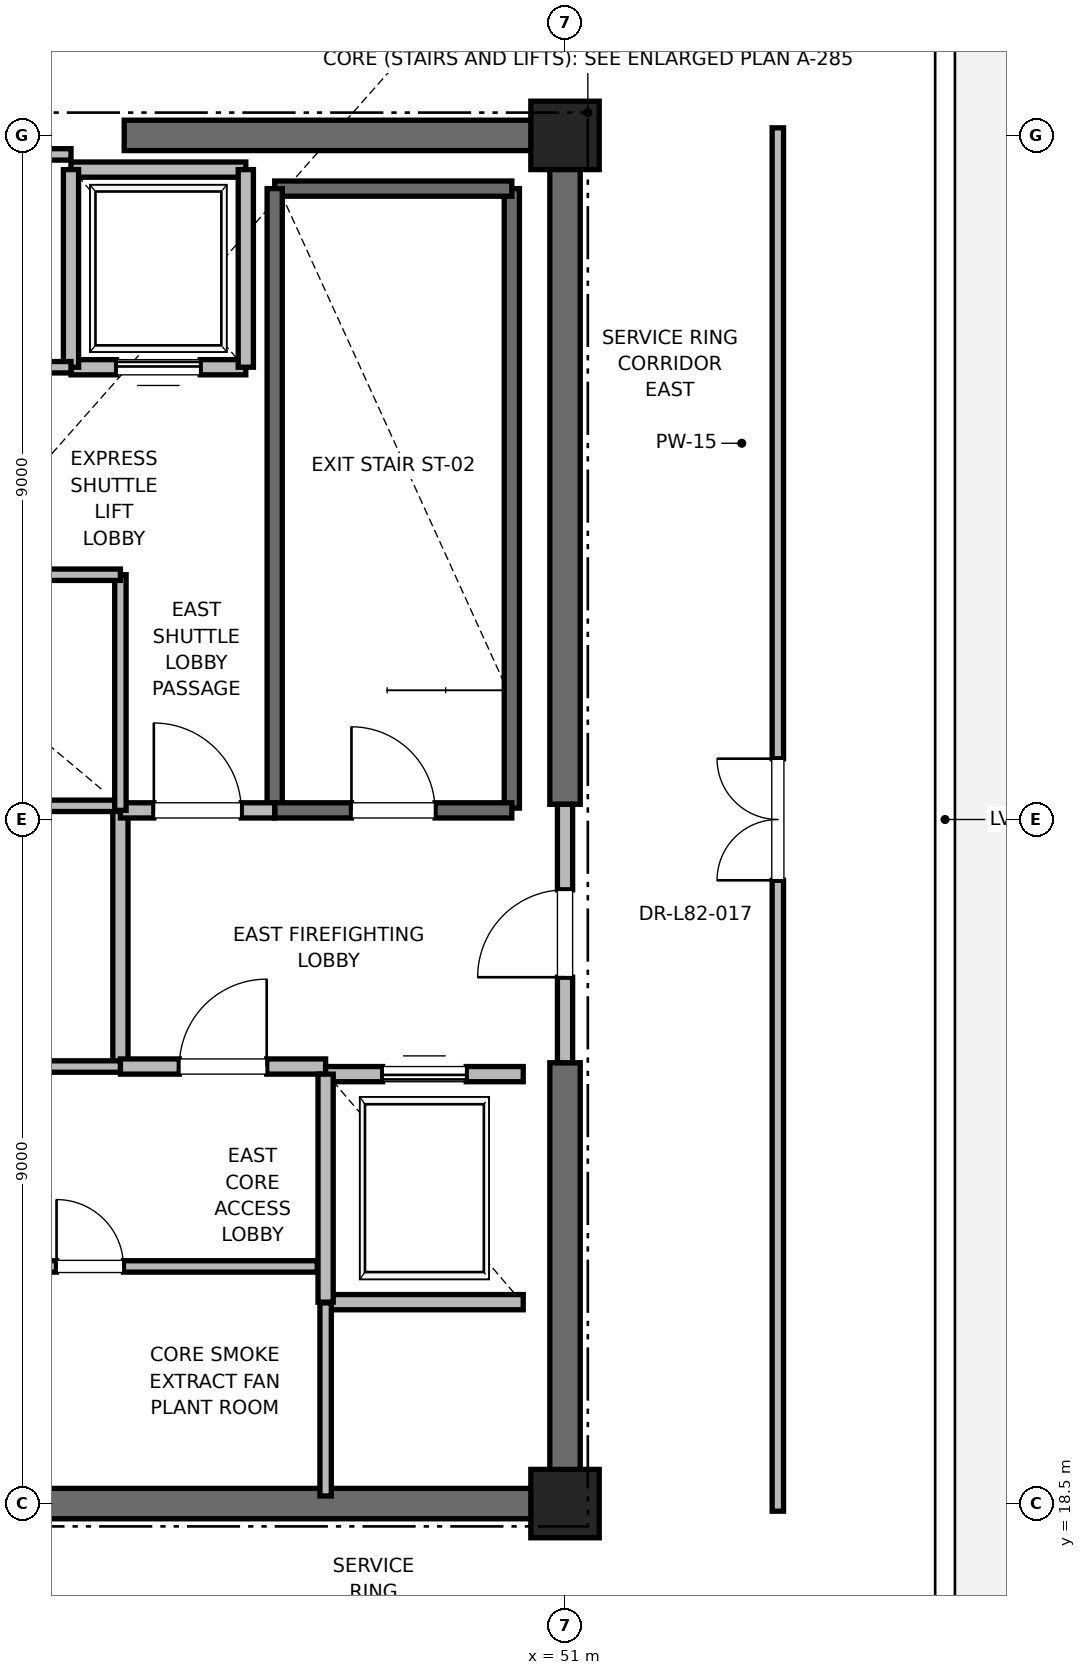
"""IFC4 building model, lengths in metres.
Left out: names, types, materials, properties, quantities, classifications, styles, units other than length and angle.
Written with IfcOpenShell. Run it as: python <this file> out.ifc"""

import sys

from ifc_helpers import new_model, si_unit, direction, frame, frame_2d, origin, origin_2d, place, context, subcontext, project, spatial, rectangle, extrude, element, fill, save


model = new_model("IFC4")
c1 = context("Model", 3, precision=1e-05, world=origin(), true_north=direction((0.0, 1.0)))
c2 = subcontext(c1, "Body", "Model", "MODEL_VIEW")
j1 = project(units=[si_unit("LENGTHUNIT", "METRE"), si_unit("PLANEANGLEUNIT", "RADIAN")], contexts=[c1])
p1 = place(None, origin())
s1 = spatial("IfcSite", under=j1, at=p1, CompositionType="ELEMENT")
p2 = place(p1, origin())
s2 = spatial("IfcBuilding", under=s1, at=p2, CompositionType="ELEMENT")
p3 = place(p2, frame((0.0, 0.0, 354.3)))
s3 = spatial("IfcBuildingStorey", under=s2, at=p3, CompositionType="ELEMENT", Elevation=354.3)
for number, where, z_axis, x_axis in (
    (1, (51.0, 18.5, 0.0), (0.0, 0.0, 1.0), (1.0, 0.0, 0.0)),
    (2, (51.0, 36.5, 0.0), (0.0, 0.0, 1.0), (1.0, 0.0, 0.0)),
):
    element("IfcColumn", number, at=place(p3, frame(where, z_axis=z_axis, x_axis=x_axis)), inside=s3, PredefinedType="PILASTER", context=c2, shape_type="SweptSolid", body=[
        extrude(rectangle(XDim=0.9, YDim=0.9, at=origin_2d()), origin(), (0.0, 0.0, 1.0), 5.5),
    ])
p4 = place(p3, frame((41.8, 18.5, 0.0), z_axis=(0.0, 0.0, 1.0), x_axis=(1.0, 0.0, 0.0)))
e3 = element("IfcWall", 3, at=p4, inside=s3, PredefinedType="SHEAR", context=c2, shape_type="SweptSolid", body=[
    extrude(rectangle(XDim=9.2, YDim=0.4, at=frame_2d((4.6, 0.0))), origin(), (0.0, 0.0, 1.0), 5.24),
])
for number, where, z_axis, x_axis in (
    (4, (45.2, 36.5, 0.0), (0.0, 0.0, 1.0), (1.0, 0.0, 0.0)),
    (5, (51.0, 18.5, 0.0), (0.0, 0.0, 1.0), (0.0, 1.0, 0.0)),
):
    element("IfcWall", number, at=place(p3, frame(where, z_axis=z_axis, x_axis=x_axis)), inside=s3, PredefinedType="SHEAR", context=c2, shape_type="SweptSolid", body=[
        extrude(rectangle(XDim=5.8, YDim=0.4, at=frame_2d((2.9, 0.0))), origin(), (0.0, 0.0, 1.0), 5.24),
    ])
p5 = place(p3, frame((51.0, 27.7, 0.0), z_axis=(0.0, 0.0, 1.0), x_axis=(0.0, 1.0, 0.0)))
e6 = element("IfcWall", 6, at=p5, inside=s3, PredefinedType="SHEAR", context=c2, shape_type="SweptSolid", body=[
    extrude(rectangle(XDim=8.8, YDim=0.4, at=frame_2d((4.4, 0.0))), origin(), (0.0, 0.0, 1.0), 5.24),
])
p6 = place(p3, frame((50.3, 27.65, 0.0), z_axis=(0.0, 0.0, 1.0), x_axis=(0.0, 1.0, 0.0)))
e7 = element("IfcWall", 7, at=p6, inside=s3, PredefinedType="SOLIDWALL", context=c2, shape_type="SweptSolid", body=[
    extrude(rectangle(XDim=8.15, YDim=0.2, at=frame_2d((4.075, 0.0))), origin(), (0.0, 0.0, 1.0), 5.24),
])
p7 = place(p3, frame((47.18, 35.8, 0.0), z_axis=(0.0, 0.0, 1.0), x_axis=(1.0, 0.0, 0.0)))
e8 = element("IfcWall", 8, at=p7, inside=s3, PredefinedType="SOLIDWALL", context=c2, shape_type="SweptSolid", body=[
    extrude(rectangle(XDim=3.12, YDim=0.2, at=frame_2d((1.56, 0.0))), origin(), (0.0, 0.0, 1.0), 5.24),
])
p8 = place(p3, frame((47.18, 27.62, 0.0), z_axis=(0.0, 0.0, 1.0), x_axis=(0.0, 1.0, 0.0)))
e9 = element("IfcWall", 9, at=p8, inside=s3, PredefinedType="SOLIDWALL", context=c2, shape_type="SweptSolid", body=[
    extrude(rectangle(XDim=8.18, YDim=0.2, at=frame_2d((4.09, 0.0))), origin(), (0.0, 0.0, 1.0), 5.24),
])
p9 = place(p3, frame((47.18, 27.62, 0.0), z_axis=(0.0, 0.0, 1.0), x_axis=(1.0, 0.0, 0.0)))
e10 = element("IfcWall", 10, at=p9, inside=s3, PredefinedType="SOLIDWALL", context=c2, shape_type="SweptSolid", body=[
    extrude(rectangle(XDim=3.12, YDim=0.2, at=frame_2d((1.56, 0.0))), origin(), (0.0, 0.0, 1.0), 5.24),
])
p10 = place(p9, frame((1.01, 0.0, 0.0)))
e11 = element("IfcOpeningElement", 11, at=p10, cuts=e10, PredefinedType="OPENING", context=c2, shape_type="SweptSolid", body=[
    extrude(rectangle(XDim=1.1, YDim=2.15, at=frame_2d((0.55, 1.075))), frame((0.0, 0.1, 0.0), z_axis=(0.0, -1.0, 0.0), x_axis=(1.0, 0.0, 0.0)), (0.0, 0.0, 1.0), 0.2),
])
p11 = place(p3, frame((45.15, 24.25, 0.0), z_axis=(0.0, 0.0, 1.0), x_axis=(0.0, 1.0, 0.0)))
e12 = element("IfcWall", 12, at=p11, inside=s3, PredefinedType="PARTITIONING", context=c2, shape_type="SweptSolid", body=[
    extrude(rectangle(XDim=3.37, YDim=0.2, at=frame_2d((1.685, 0.0))), origin(), (0.0, 0.0, 1.0), 5.24),
])
p12 = place(p3, frame((45.15, 24.25, 0.0), z_axis=(0.0, 0.0, 1.0), x_axis=(1.0, 0.0, 0.0)))
e13 = element("IfcWall", 13, at=p12, inside=s3, PredefinedType="PARTITIONING", context=c2, shape_type="SweptSolid", body=[
    extrude(rectangle(XDim=2.7, YDim=0.2, at=frame_2d((1.35, 0.0))), origin(), (0.0, 0.0, 1.0), 5.24),
])
p13 = place(p12, frame((0.775, 0.0, 0.0)))
e14 = element("IfcOpeningElement", 14, at=p13, cuts=e13, PredefinedType="OPENING", context=c2, shape_type="SweptSolid", body=[
    extrude(rectangle(XDim=1.15, YDim=2.2, at=frame_2d((0.575, 1.1))), frame((0.0, 0.1, 0.0), z_axis=(0.0, -1.0, 0.0), x_axis=(1.0, 0.0, 0.0)), (0.0, 0.0, 1.0), 0.2),
])
p14 = place(p3, frame((45.15, 27.62, 0.0), z_axis=(0.0, 0.0, 1.0), x_axis=(1.0, 0.0, 0.0)))
e15 = element("IfcWall", 15, at=p14, inside=s3, PredefinedType="PARTITIONING", context=c2, shape_type="SweptSolid", body=[
    extrude(rectangle(XDim=2.03, YDim=0.2, at=frame_2d((1.015, 0.0))), origin(), (0.0, 0.0, 1.0), 5.24),
])
p15 = place(p14, frame((0.44, 0.0, 0.0)))
e16 = element("IfcOpeningElement", 16, at=p15, cuts=e15, PredefinedType="OPENING", context=c2, shape_type="SweptSolid", body=[
    extrude(rectangle(XDim=1.15, YDim=2.2, at=frame_2d((0.575, 1.1))), frame((0.0, 0.1, 0.0), z_axis=(0.0, -1.0, 0.0), x_axis=(1.0, 0.0, 0.0)), (0.0, 0.0, 1.0), 0.2),
])
p16 = place(p3, frame((51.0, 24.3, 0.0), z_axis=(0.0, 0.0, 1.0), x_axis=(0.0, 1.0, 0.0)))
e17 = element("IfcWall", 17, at=p16, inside=s3, PredefinedType="PARTITIONING", context=c2, shape_type="SweptSolid", body=[
    extrude(rectangle(XDim=3.4, YDim=0.2, at=frame_2d((1.7, 0.0))), origin(), (0.0, 0.0, 1.0), 4.32),
])
p17 = place(p16, frame((1.125, 0.0, 0.0)))
e18 = element("IfcOpeningElement", 18, at=p17, cuts=e17, PredefinedType="OPENING", context=c2, shape_type="SweptSolid", body=[
    extrude(rectangle(XDim=1.15, YDim=2.2, at=frame_2d((0.575, 1.1))), frame((0.0, 0.1, 0.0), z_axis=(0.0, -1.0, 0.0), x_axis=(1.0, 0.0, 0.0)), (0.0, 0.0, 1.0), 0.2),
])
p18 = place(p3, frame((47.85, 21.15, 0.0), z_axis=(0.0, 0.0, 1.0), x_axis=(1.0, 0.0, 0.0)))
e19 = element("IfcWall", 19, at=p18, inside=s3, PredefinedType="SOLIDWALL", context=c2, shape_type="SweptSolid", body=[
    extrude(rectangle(XDim=2.6, YDim=0.2, at=frame_2d((1.3, 0.0))), origin(), (0.0, 0.0, 1.0), 5.24),
])
p19 = place(p3, frame((50.45, 24.15, 0.0), z_axis=(0.0, 0.0, 1.0), x_axis=(-1.0, 0.0, 0.0)))
e20 = element("IfcWall", 20, at=p19, inside=s3, PredefinedType="SOLIDWALL", context=c2, shape_type="SweptSolid", body=[
    extrude(rectangle(XDim=2.6, YDim=0.2, at=frame_2d((1.3, 0.0))), origin(), (0.0, 0.0, 1.0), 4.32),
])
p20 = place(p19, frame((0.75, 0.0, 0.0)))
e21 = element("IfcOpeningElement", 21, at=p20, cuts=e20, PredefinedType="OPENING", context=c2, shape_type="SweptSolid", body=[
    extrude(rectangle(XDim=1.1, YDim=2.2, at=frame_2d((0.55, 1.1))), frame((0.0, 0.1, 0.0), z_axis=(0.0, -1.0, 0.0), x_axis=(1.0, 0.0, 0.0)), (0.0, 0.0, 1.0), 0.2),
])
p21 = place(p3, frame((47.85, 24.15, 0.0), z_axis=(0.0, 0.0, 1.0), x_axis=(0.0, -1.0, 0.0)))
e22 = element("IfcWall", 22, at=p21, inside=s3, PredefinedType="SOLIDWALL", context=c2, shape_type="SweptSolid", body=[
    extrude(rectangle(XDim=3.0, YDim=0.2, at=frame_2d((1.5, 0.0))), origin(), (0.0, 0.0, 1.0), 5.24),
])
p22 = place(p3, frame((44.5, 33.45, 0.0), z_axis=(0.0, 0.0, 1.0), x_axis=(1.0, 0.0, 0.0)))
e23 = element("IfcWall", 23, at=p22, inside=s3, PredefinedType="SOLIDWALL", context=c2, shape_type="SweptSolid", body=[
    extrude(rectangle(XDim=2.3, YDim=0.2, at=frame_2d((1.15, 0.0))), origin(), (0.0, 0.0, 1.0), 5.24),
])
p23 = place(p22, frame((0.6, 0.0, 0.0)))
e24 = element("IfcOpeningElement", 24, at=p23, cuts=e23, PredefinedType="OPENING", context=c2, shape_type="SweptSolid", body=[
    extrude(rectangle(XDim=1.1, YDim=2.2, at=frame_2d((0.55, 1.1))), frame((0.0, 0.1, 0.0), z_axis=(0.0, -1.0, 0.0), x_axis=(1.0, 0.0, 0.0)), (0.0, 0.0, 1.0), 0.2),
])
p24 = place(p3, frame((46.8, 36.05, 0.0), z_axis=(0.0, 0.0, 1.0), x_axis=(-1.0, 0.0, 0.0)))
e25 = element("IfcWall", 25, at=p24, inside=s3, PredefinedType="SOLIDWALL", context=c2, shape_type="SweptSolid", body=[
    extrude(rectangle(XDim=2.3, YDim=0.2, at=frame_2d((1.15, 0.0))), origin(), (0.0, 0.0, 1.0), 4.32),
])
p25 = place(p3, frame((44.5, 36.05, 0.0), z_axis=(0.0, 0.0, 1.0), x_axis=(0.0, -1.0, 0.0)))
e26 = element("IfcWall", 26, at=p25, inside=s3, PredefinedType="SOLIDWALL", context=c2, shape_type="SweptSolid", body=[
    extrude(rectangle(XDim=2.6, YDim=0.2, at=frame_2d((1.3, 0.0))), origin(), (0.0, 0.0, 1.0), 4.32),
])
p26 = place(p3, frame((46.8, 33.45, 0.0), z_axis=(0.0, 0.0, 1.0), x_axis=(0.0, 1.0, 0.0)))
e27 = element("IfcWall", 27, at=p26, inside=s3, PredefinedType="SOLIDWALL", context=c2, shape_type="SweptSolid", body=[
    extrude(rectangle(XDim=2.6, YDim=0.2, at=frame_2d((1.3, 0.0))), origin(), (0.0, 0.0, 1.0), 5.24),
])
p27 = place(p3, frame((41.56, 27.68, 0.0), z_axis=(0.0, 0.0, 1.0), x_axis=(1.0, 0.0, 0.0)))
e28 = element("IfcWall", 28, at=p27, inside=s3, PredefinedType="PARTITIONING", context=c2, shape_type="SweptSolid", body=[
    extrude(rectangle(XDim=3.59, YDim=0.15, at=frame_2d((1.795, 0.0))), origin(), (0.0, 0.0, 1.0), 2.85),
])
p28 = place(p3, frame((47.85, 18.6, 0.0), z_axis=(0.0, 0.0, 1.0), x_axis=(0.0, 1.0, 0.0)))
e29 = element("IfcWall", 29, at=p28, inside=s3, PredefinedType="PARTITIONING", context=c2, shape_type="SweptSolid", body=[
    extrude(rectangle(XDim=2.54, YDim=0.15, at=frame_2d((1.27, 0.0))), origin(), (0.0, 0.0, 1.0), 2.85),
])
p29 = place(p3, frame((41.76, 21.62, 0.0), z_axis=(0.0, 0.0, 1.0), x_axis=(1.0, 0.0, 0.0)))
e30 = element("IfcWall", 30, at=p29, inside=s3, PredefinedType="PARTITIONING", context=c2, shape_type="SweptSolid", body=[
    extrude(rectangle(XDim=5.98, YDim=0.15, at=frame_2d((2.99, 0.0))), origin(), (0.0, 0.0, 1.0), 2.85),
])
p30 = place(p29, frame((2.55, 0.0, 0.0)))
e31 = element("IfcOpeningElement", 31, at=p30, cuts=e30, PredefinedType="OPENING", context=c2, shape_type="SweptSolid", body=[
    extrude(rectangle(XDim=0.88, YDim=2.1, at=frame_2d((0.44, 1.05))), frame((0.0, 0.075, 0.0), z_axis=(0.0, -1.0, 0.0), x_axis=(1.0, 0.0, 0.0)), (0.0, 0.0, 1.0), 0.15),
])
p31 = place(p3, frame((41.76, 24.25, 0.0), z_axis=(0.0, 0.0, 1.0), x_axis=(1.0, 0.0, 0.0)))
e32 = element("IfcWall", 32, at=p31, inside=s3, PredefinedType="PARTITIONING", context=c2, shape_type="SweptSolid", body=[
    extrude(rectangle(XDim=3.39, YDim=0.15, at=frame_2d((1.695, 0.0))), origin(), (0.0, 0.0, 1.0), 2.85),
])
p32 = place(p31, frame((1.255, 0.0, 0.0)))
e33 = element("IfcOpeningElement", 33, at=p32, cuts=e32, PredefinedType="OPENING", context=c2, shape_type="SweptSolid", body=[
    extrude(rectangle(XDim=0.88, YDim=2.1, at=frame_2d((0.44, 1.05))), frame((0.0, 0.075, 0.0), z_axis=(0.0, -1.0, 0.0), x_axis=(1.0, 0.0, 0.0)), (0.0, 0.0, 1.0), 0.15),
])
p33 = place(p3, frame((45.15, 27.62, 0.0), z_axis=(0.0, 0.0, 1.0), x_axis=(0.0, 1.0, 0.0)))
e34 = element("IfcWall", 34, at=p33, inside=s3, PredefinedType="PARTITIONING", context=c2, shape_type="SweptSolid", body=[
    extrude(rectangle(XDim=3.1, YDim=0.15, at=frame_2d((1.55, 0.0))), origin(), (0.0, 0.0, 1.0), 2.85),
])
p34 = place(p3, frame((41.56, 30.72, 0.0), z_axis=(0.0, 0.0, 1.0), x_axis=(1.0, 0.0, 0.0)))
e35 = element("IfcWall", 35, at=p34, inside=s3, PredefinedType="PARTITIONING", context=c2, shape_type="SweptSolid", body=[
    extrude(rectangle(XDim=3.59, YDim=0.15, at=frame_2d((1.795, 0.0))), origin(), (0.0, 0.0, 1.0), 2.85),
])
p35 = place(p34, frame((1.355, 0.0, 0.0)))
e36 = element("IfcOpeningElement", 36, at=p35, cuts=e35, PredefinedType="OPENING", context=c2, shape_type="SweptSolid", body=[
    extrude(rectangle(XDim=0.88, YDim=2.1, at=frame_2d((0.44, 1.05))), frame((0.0, 0.075, 0.0), z_axis=(0.0, -1.0, 0.0), x_axis=(1.0, 0.0, 0.0)), (0.0, 0.0, 1.0), 0.15),
])
p36 = place(p3, frame((41.56, 36.25, 0.0), z_axis=(0.0, 0.0, 1.0), x_axis=(1.0, 0.0, 0.0)))
e37 = element("IfcWall", 37, at=p36, inside=s3, PredefinedType="PARTITIONING", context=c2, shape_type="SweptSolid", body=[
    extrude(rectangle(XDim=2.94, YDim=0.15, at=frame_2d((1.47, 0.0))), origin(), (0.0, 0.0, 1.0), 2.85),
])
p37 = place(p3, frame((41.56, 33.45, 0.0), z_axis=(0.0, 0.0, 1.0), x_axis=(1.0, 0.0, 0.0)))
e38 = element("IfcWall", 38, at=p37, inside=s3, PredefinedType="PARTITIONING", context=c2, shape_type="SweptSolid", body=[
    extrude(rectangle(XDim=2.94, YDim=0.15, at=frame_2d((1.47, 0.0))), origin(), (0.0, 0.0, 1.0), 2.85),
])
p38 = place(p37, frame((1.03, 0.0, 0.0)))
e39 = element("IfcOpeningElement", 39, at=p38, cuts=e38, PredefinedType="OPENING", context=c2, shape_type="SweptSolid", body=[
    extrude(rectangle(XDim=0.88, YDim=2.1, at=frame_2d((0.44, 1.05))), frame((0.0, 0.075, 0.0), z_axis=(0.0, -1.0, 0.0), x_axis=(1.0, 0.0, 0.0)), (0.0, 0.0, 1.0), 0.15),
])
p39 = place(p3, frame((53.8, 18.4, 0.0), z_axis=(0.0, 0.0, 1.0), x_axis=(0.0, 1.0, 0.0)))
e40 = element("IfcWall", 40, at=p39, inside=s3, PredefinedType="PARTITIONING", context=c2, shape_type="SweptSolid", body=[
    extrude(rectangle(XDim=18.2, YDim=0.15, at=frame_2d((9.1, 0.0))), origin(), (0.0, 0.0, 1.0), 2.85),
])
p40 = place(p39, frame((8.3, 0.0, 0.0)))
e41 = element("IfcOpeningElement", 41, at=p40, cuts=e40, PredefinedType="OPENING", context=c2, shape_type="SweptSolid", body=[
    extrude(rectangle(XDim=1.6, YDim=2.25, at=frame_2d((0.8, 1.125))), frame((0.0, 0.075, 0.0), z_axis=(0.0, -1.0, 0.0), x_axis=(1.0, 0.0, 0.0)), (0.0, 0.0, 1.0), 0.15),
])
p41 = place(p10, origin())
e42 = element("IfcDoor", 42, at=p41, inside=s3, OperationType="SINGLE_SWING_LEFT", PredefinedType="DOOR", context=c2, shape_type="SweptSolid", body=[
    extrude(rectangle(XDim=1.1, YDim=2.15, at=frame_2d((0.55, 1.075))), frame((0.0, 0.025, 0.0), z_axis=(0.0, -1.0, 0.0), x_axis=(1.0, 0.0, 0.0)), (0.0, 0.0, 1.0), 0.05),
])
fill(e11, e42)
p42 = place(p13, origin())
e43 = element("IfcDoor", 43, at=p42, inside=s3, OperationType="SINGLE_SWING_RIGHT", PredefinedType="DOOR", context=c2, shape_type="SweptSolid", body=[
    extrude(rectangle(XDim=1.15, YDim=2.2, at=frame_2d((0.575, 1.1))), frame((0.0, 0.025, 0.0), z_axis=(0.0, -1.0, 0.0), x_axis=(1.0, 0.0, 0.0)), (0.0, 0.0, 1.0), 0.05),
])
fill(e14, e43)
p43 = place(p15, origin())
e44 = element("IfcDoor", 44, at=p43, inside=s3, OperationType="SINGLE_SWING_LEFT", PredefinedType="DOOR", context=c2, shape_type="SweptSolid", body=[
    extrude(rectangle(XDim=1.15, YDim=2.2, at=frame_2d((0.575, 1.1))), frame((0.0, 0.025, 0.0), z_axis=(0.0, -1.0, 0.0), x_axis=(1.0, 0.0, 0.0)), (0.0, 0.0, 1.0), 0.05),
])
fill(e16, e44)
p44 = place(p17, origin())
e45 = element("IfcDoor", 45, at=p44, inside=s3, OperationType="SINGLE_SWING_LEFT", PredefinedType="DOOR", context=c2, shape_type="SweptSolid", body=[
    extrude(rectangle(XDim=1.15, YDim=2.2, at=frame_2d((0.575, 1.1))), frame((0.0, 0.025, 0.0), z_axis=(0.0, -1.0, 0.0), x_axis=(1.0, 0.0, 0.0)), (0.0, 0.0, 1.0), 0.05),
])
fill(e18, e45)
p45 = place(p20, origin())
e46 = element("IfcDoor", 46, at=p45, inside=s3, OperationType="SLIDING_TO_RIGHT", PredefinedType="DOOR", context=c2, shape_type="SweptSolid", body=[
    extrude(rectangle(XDim=1.1, YDim=2.2, at=frame_2d((0.55, 1.1))), frame((0.0, 0.025, 0.0), z_axis=(0.0, -1.0, 0.0), x_axis=(1.0, 0.0, 0.0)), (0.0, 0.0, 1.0), 0.05),
])
fill(e21, e46)
p46 = place(p23, origin())
e47 = element("IfcDoor", 47, at=p46, inside=s3, OperationType="SLIDING_TO_RIGHT", PredefinedType="DOOR", context=c2, shape_type="SweptSolid", body=[
    extrude(rectangle(XDim=1.1, YDim=2.2, at=frame_2d((0.55, 1.1))), frame((0.0, 0.025, 0.0), z_axis=(0.0, -1.0, 0.0), x_axis=(1.0, 0.0, 0.0)), (0.0, 0.0, 1.0), 0.05),
])
fill(e24, e47)
p47 = place(p30, origin())
e48 = element("IfcDoor", 48, at=p47, inside=s3, OperationType="SINGLE_SWING_LEFT", PredefinedType="DOOR", context=c2, shape_type="SweptSolid", body=[
    extrude(rectangle(XDim=0.88, YDim=2.1, at=frame_2d((0.44, 1.05))), frame((0.0, 0.025, 0.0), z_axis=(0.0, -1.0, 0.0), x_axis=(1.0, 0.0, 0.0)), (0.0, 0.0, 1.0), 0.05),
])
fill(e31, e48)
p48 = place(p40, origin())
e49 = element("IfcDoor", 49, at=p48, inside=s3, OperationType="DOUBLE_DOOR_SINGLE_SWING", PredefinedType="DOOR", context=c2, shape_type="SweptSolid", body=[
    extrude(rectangle(XDim=1.6, YDim=2.25, at=frame_2d((0.8, 1.125))), frame((0.0, 0.025, 0.0), z_axis=(0.0, -1.0, 0.0), x_axis=(1.0, 0.0, 0.0)), (0.0, 0.0, 1.0), 0.05),
])
fill(e41, e49)
save(model, sys.argv[1])
